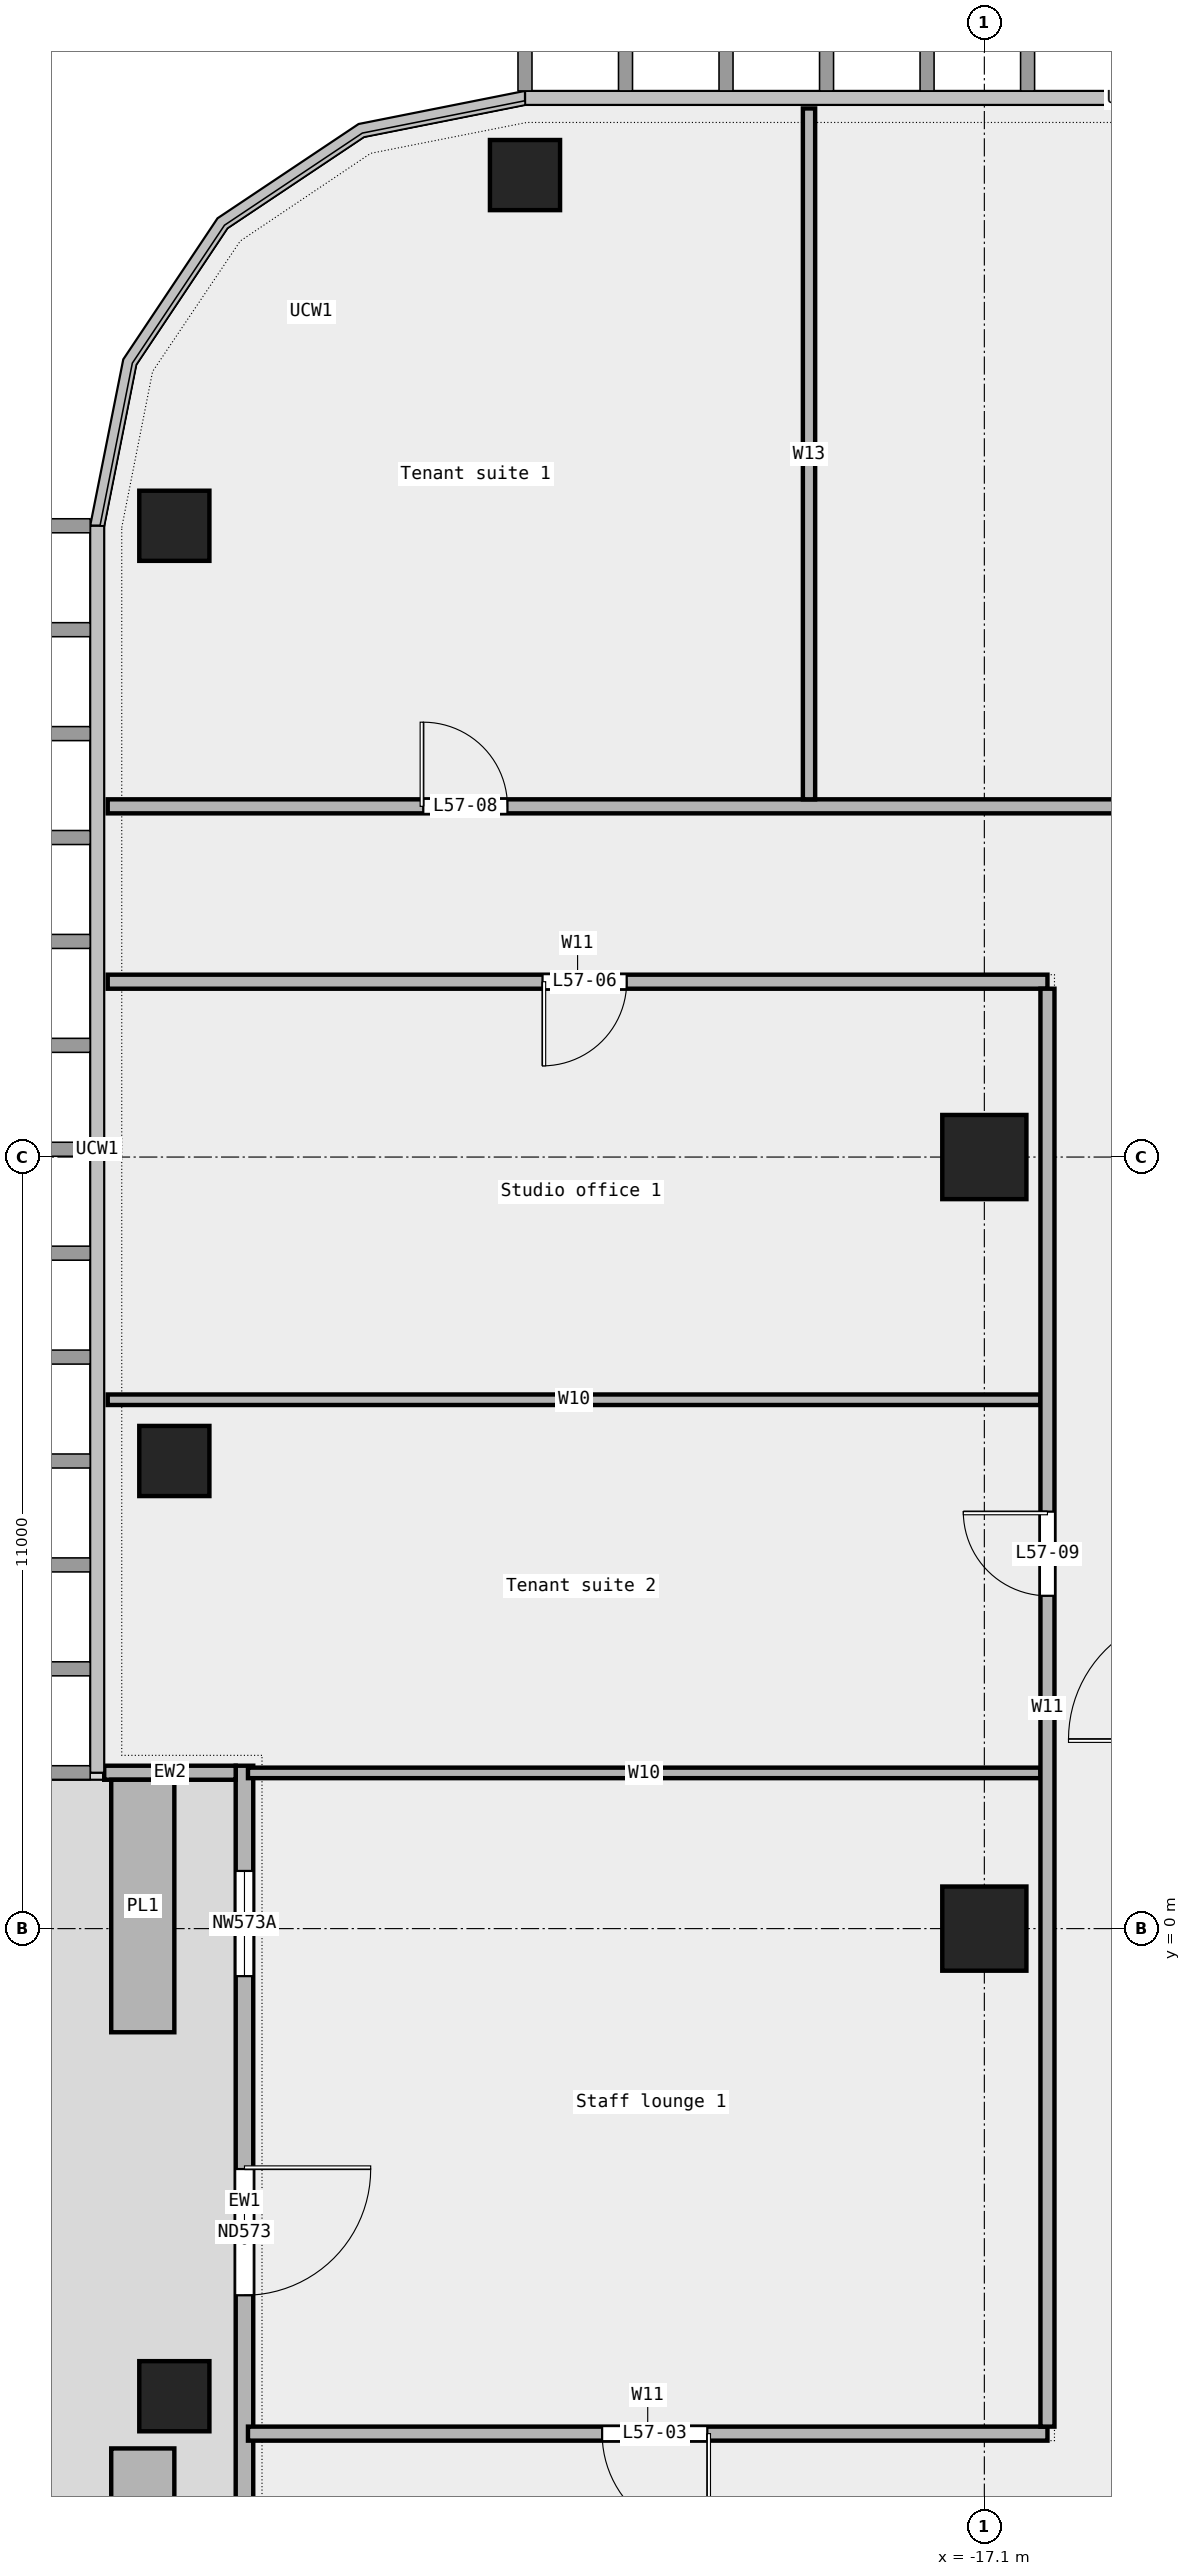
"""IFC4 building model, lengths in metres.
Left out: names, types, materials, properties, quantities, classifications, styles, units other than length and angle.
Written with IfcOpenShell. Run it as: python <this file> out.ifc"""

import sys

from ifc_helpers import new_model, si_unit, direction, frame, frame_2d, origin, origin_2d, place, context, subcontext, project, spatial, rectangle, extrude, element, fill, save


model = new_model("IFC4")
c1 = context("Model", 3, precision=1e-05, world=origin(), true_north=direction((0.0, 1.0)))
c2 = subcontext(c1, "Body", "Model", "MODEL_VIEW")
j1 = project(units=[si_unit("LENGTHUNIT", "METRE"), si_unit("PLANEANGLEUNIT", "RADIAN")], contexts=[c1])
p1 = place(None, origin())
s1 = spatial("IfcSite", under=j1, at=p1, CompositionType="ELEMENT")
p2 = place(p1, origin())
s2 = spatial("IfcBuilding", under=s1, at=p2, CompositionType="ELEMENT")
p3 = place(p2, frame((0.0, 0.0, 267.4)))
s3 = spatial("IfcBuildingStorey", under=s2, at=p3, CompositionType="ELEMENT", Elevation=267.4)
for number, where, z_axis, x_axis in (
    (1, (-23.65, 25.0, 0.0), (0.0, 0.0, 1.0), (1.0, 0.0, 0.0)),
    (2, (-28.65, 20.0, 0.0), (0.0, 0.0, 1.0), (1.0, 0.0, 0.0)),
    (3, (-28.65, 6.667, 0.0), (0.0, 0.0, 1.0), (1.0, 0.0, 0.0)),
    (4, (-28.65, -6.667, 0.0), (0.0, 0.0, 1.0), (1.0, 0.0, 0.0)),
):
    element("IfcColumn", number, at=place(p3, frame(where, z_axis=z_axis, x_axis=x_axis)), inside=s3, PredefinedType="COLUMN", context=c2, shape_type="SweptSolid", body=[
        extrude(rectangle(XDim=1.0, YDim=1.0, at=origin_2d()), origin(), (0.0, 0.0, 1.0), 3.6),
    ])
for number, where, z_axis, x_axis in (
    (5, (-17.1, 0.0, 0.0), (0.0, 0.0, 1.0), (1.0, 0.0, 0.0)),
    (6, (-17.1, 11.0, 0.0), (0.0, 0.0, 1.0), (1.0, 0.0, 0.0)),
):
    element("IfcColumn", number, at=place(p3, frame(where, z_axis=z_axis, x_axis=x_axis)), inside=s3, PredefinedType="COLUMN", context=c2, shape_type="SweptSolid", body=[
        extrude(rectangle(XDim=1.2, YDim=1.2, at=origin_2d()), origin(), (0.0, 0.0, 1.0), 3.6),
    ])
p4 = place(p3, frame((-27.65, 2.322, 0.0), z_axis=(0.0, 0.0, 1.0), x_axis=(0.0, -1.0, 0.0)))
e7 = element("IfcWall", 7, at=p4, inside=s3, PredefinedType="STANDARD", context=c2, shape_type="SweptSolid", body=[
    extrude(rectangle(XDim=13.533, YDim=0.25, at=frame_2d((6.767, 0.0))), origin(), (0.0, 0.0, 1.0), 3.6),
])
p5 = place(p4, frame((1.5, 0.0, 0.45)))
e8 = element("IfcOpeningElement", 8, at=p5, cuts=e7, PredefinedType="OPENING", context=c2, shape_type="SweptSolid", body=[
    extrude(rectangle(XDim=1.5, YDim=2.4, at=frame_2d((0.75, 1.2))), frame((0.0, 0.137, 0.0), z_axis=(0.0, -1.0, 0.0), x_axis=(1.0, 0.0, 0.0)), (0.0, 0.0, 1.0), 0.274),
])
p6 = place(p4, frame((5.75, 0.0, 0.0)))
e9 = element("IfcOpeningElement", 9, at=p6, cuts=e7, PredefinedType="OPENING", context=c2, shape_type="SweptSolid", body=[
    extrude(rectangle(XDim=1.8, YDim=2.4, at=frame_2d((0.9, 1.2))), frame((0.0, 0.137, 0.0), z_axis=(0.0, -1.0, 0.0), x_axis=(1.0, 0.0, 0.0)), (0.0, 0.0, 1.0), 0.274),
])
p7 = place(p4, frame((10.5, 0.0, 0.45)))
e10 = element("IfcOpeningElement", 10, at=p7, cuts=e7, PredefinedType="OPENING", context=c2, shape_type="SweptSolid", body=[
    extrude(rectangle(XDim=1.5, YDim=2.4, at=frame_2d((0.75, 1.2))), frame((0.0, 0.137, 0.0), z_axis=(0.0, -1.0, 0.0), x_axis=(1.0, 0.0, 0.0)), (0.0, 0.0, 1.0), 0.274),
])
p8 = place(p3, frame((-29.65, 2.222, 0.0), z_axis=(0.0, 0.0, 1.0), x_axis=(1.0, 0.0, 0.0)))
e11 = element("IfcWall", 11, at=p8, inside=s3, PredefinedType="STANDARD", context=c2, shape_type="SweptSolid", body=[
    extrude(rectangle(XDim=1.875, YDim=0.2, at=frame_2d((0.938, 0.0))), origin(), (0.0, 0.0, 1.0), 3.6),
])
for number, where, z_axis, x_axis in (
    (12, (-29.1, 2.122, 0.0), (0.0, 0.0, 1.0), (0.0, -1.0, 0.0)),
    (13, (-29.1, -7.411, 0.0), (0.0, 0.0, 1.0), (0.0, -1.0, 0.0)),
):
    element("IfcWall", number, at=place(p3, frame(where, z_axis=z_axis, x_axis=x_axis)), inside=s3, PredefinedType="STANDARD", context=c2, shape_type="SweptSolid", body=[
        extrude(rectangle(XDim=3.6, YDim=0.9, at=frame_2d((1.8, 0.0))), origin(), (0.0, 0.0, 1.0), 0.7),
    ])
p9 = place(p3, frame((-27.6, -7.2, 0.0), z_axis=(0.0, 0.0, 1.0), x_axis=(1.0, 0.0, 0.0)))
e14 = element("IfcWall", 14, at=p9, inside=s3, PredefinedType="PARTITIONING", context=c2, shape_type="SweptSolid", body=[
    extrude(rectangle(XDim=11.4, YDim=0.2, at=frame_2d((5.7, 0.0))), origin(), (0.0, 0.0, 1.0), 3.6),
])
p10 = place(p9, frame((5.05, 0.0, 0.0)))
e15 = element("IfcOpeningElement", 15, at=p10, cuts=e14, PredefinedType="OPENING", context=c2, shape_type="SweptSolid", body=[
    extrude(rectangle(XDim=1.5, YDim=2.1, at=frame_2d((0.75, 1.05))), frame((0.0, 0.112, 0.0), z_axis=(0.0, -1.0, 0.0), x_axis=(1.0, 0.0, 0.0)), (0.0, 0.0, 1.0), 0.224),
])
p11 = place(p3, frame((-27.6, 2.22, 0.0), z_axis=(0.0, 0.0, 1.0), x_axis=(1.0, 0.0, 0.0)))
e16 = element("IfcWall", 16, at=p11, inside=s3, PredefinedType="PARTITIONING", context=c2, shape_type="SweptSolid", body=[
    extrude(rectangle(XDim=11.3, YDim=0.15, at=frame_2d((5.65, 0.0))), origin(), (0.0, 0.0, 1.0), 3.6),
])
p12 = place(p3, frame((-29.6, 7.54, 0.0), z_axis=(0.0, 0.0, 1.0), x_axis=(1.0, 0.0, 0.0)))
e17 = element("IfcWall", 17, at=p12, inside=s3, PredefinedType="PARTITIONING", context=c2, shape_type="SweptSolid", body=[
    extrude(rectangle(XDim=13.3, YDim=0.15, at=frame_2d((6.65, 0.0))), origin(), (0.0, 0.0, 1.0), 3.6),
])
p13 = place(p3, frame((-29.6, 13.5, 0.0), z_axis=(0.0, 0.0, 1.0), x_axis=(1.0, 0.0, 0.0)))
e18 = element("IfcWall", 18, at=p13, inside=s3, PredefinedType="PARTITIONING", context=c2, shape_type="SweptSolid", body=[
    extrude(rectangle(XDim=13.4, YDim=0.2, at=frame_2d((6.7, 0.0))), origin(), (0.0, 0.0, 1.0), 3.6),
])
p14 = place(p13, frame((6.2, 0.0, 0.0)))
e19 = element("IfcOpeningElement", 19, at=p14, cuts=e18, PredefinedType="OPENING", context=c2, shape_type="SweptSolid", body=[
    extrude(rectangle(XDim=1.2, YDim=2.1, at=frame_2d((0.6, 1.05))), frame((0.0, 0.112, 0.0), z_axis=(0.0, -1.0, 0.0), x_axis=(1.0, 0.0, 0.0)), (0.0, 0.0, 1.0), 0.224),
])
p15 = place(p3, frame((-29.6, 16.0, 0.0), z_axis=(0.0, 0.0, 1.0), x_axis=(1.0, 0.0, 0.0)))
e20 = element("IfcWall", 20, at=p15, inside=s3, PredefinedType="PARTITIONING", context=c2, shape_type="SweptSolid", body=[
    extrude(rectangle(XDim=59.2, YDim=0.2, at=frame_2d((29.6, 0.0))), origin(), (0.0, 0.0, 1.0), 3.6),
])
p16 = place(p15, frame((46.625, 0.0, 0.0)))
e21 = element("IfcOpeningElement", 21, at=p16, cuts=e20, PredefinedType="OPENING", context=c2, shape_type="SweptSolid", body=[
    extrude(rectangle(XDim=1.8, YDim=2.1, at=frame_2d((0.9, 1.05))), frame((0.0, 0.112, 0.0), z_axis=(0.0, -1.0, 0.0), x_axis=(1.0, 0.0, 0.0)), (0.0, 0.0, 1.0), 0.224),
])
p17 = place(p15, frame((28.85, 0.0, 0.0)))
e22 = element("IfcOpeningElement", 22, at=p17, cuts=e20, PredefinedType="OPENING", context=c2, shape_type="SweptSolid", body=[
    extrude(rectangle(XDim=1.5, YDim=2.1, at=frame_2d((0.75, 1.05))), frame((0.0, 0.112, 0.0), z_axis=(0.0, -1.0, 0.0), x_axis=(1.0, 0.0, 0.0)), (0.0, 0.0, 1.0), 0.224),
])
p18 = place(p15, frame((4.5, 0.0, 0.0)))
e23 = element("IfcOpeningElement", 23, at=p18, cuts=e20, PredefinedType="OPENING", context=c2, shape_type="SweptSolid", body=[
    extrude(rectangle(XDim=1.2, YDim=2.1, at=frame_2d((0.6, 1.05))), frame((0.0, 0.112, 0.0), z_axis=(0.0, -1.0, 0.0), x_axis=(1.0, 0.0, 0.0)), (0.0, 0.0, 1.0), 0.224),
])
p19 = place(p15, frame((15.825, 0.0, 0.0)))
e24 = element("IfcOpeningElement", 24, at=p19, cuts=e20, PredefinedType="OPENING", context=c2, shape_type="SweptSolid", body=[
    extrude(rectangle(XDim=1.5, YDim=2.1, at=frame_2d((0.75, 1.05))), frame((0.0, 0.112, 0.0), z_axis=(0.0, -1.0, 0.0), x_axis=(1.0, 0.0, 0.0)), (0.0, 0.0, 1.0), 0.224),
])
p20 = place(p3, frame((-19.6, 16.1, 0.0), z_axis=(0.0, 0.0, 1.0), x_axis=(0.0, 1.0, 0.0)))
e25 = element("IfcWall", 25, at=p20, inside=s3, PredefinedType="PARTITIONING", context=c2, shape_type="SweptSolid", body=[
    extrude(rectangle(XDim=9.85, YDim=0.175, at=frame_2d((4.925, 0.0))), origin(), (0.0, 0.0, 1.0), 3.6),
])
p21 = place(p3, frame((-16.2, -7.1, 0.0), z_axis=(0.0, 0.0, 1.0), x_axis=(0.0, 1.0, 0.0)))
e26 = element("IfcWall", 26, at=p21, inside=s3, PredefinedType="PARTITIONING", context=c2, shape_type="SweptSolid", body=[
    extrude(rectangle(XDim=20.5, YDim=0.2, at=frame_2d((10.25, 0.0))), origin(), (0.0, 0.0, 1.0), 3.6),
])
p22 = place(p21, frame((11.845, 0.0, 0.0)))
e27 = element("IfcOpeningElement", 27, at=p22, cuts=e26, PredefinedType="OPENING", context=c2, shape_type="SweptSolid", body=[
    extrude(rectangle(XDim=1.2, YDim=2.1, at=frame_2d((0.6, 1.05))), frame((0.0, 0.112, 0.0), z_axis=(0.0, -1.0, 0.0), x_axis=(1.0, 0.0, 0.0)), (0.0, 0.0, 1.0), 0.224),
])
p23 = place(p5, origin())
e28 = element("IfcWindow", 28, at=p23, inside=s3, PartitioningType="SINGLE_PANEL", PredefinedType="WINDOW", context=c2, shape_type="SweptSolid", body=[
    extrude(rectangle(XDim=1.5, YDim=2.4, at=frame_2d((0.75, 1.2))), frame((0.0, 0.03, 0.0), z_axis=(0.0, -1.0, 0.0), x_axis=(1.0, 0.0, 0.0)), (0.0, 0.0, 1.0), 0.06),
])
fill(e8, e28)
p24 = place(p6, origin())
e29 = element("IfcDoor", 29, at=p24, inside=s3, OperationType="DOUBLE_DOOR_SINGLE_SWING", PredefinedType="DOOR", context=c2, shape_type="SweptSolid", body=[
    extrude(rectangle(XDim=1.8, YDim=2.4, at=frame_2d((0.9, 1.2))), frame((0.0, 0.025, 0.0), z_axis=(0.0, -1.0, 0.0), x_axis=(1.0, 0.0, 0.0)), (0.0, 0.0, 1.0), 0.05),
])
fill(e9, e29)
p25 = place(p10, origin())
e30 = element("IfcDoor", 30, at=p25, inside=s3, OperationType="DOUBLE_DOOR_SINGLE_SWING", PredefinedType="DOOR", context=c2, shape_type="SweptSolid", body=[
    extrude(rectangle(XDim=1.5, YDim=2.1, at=frame_2d((0.75, 1.05))), frame((0.0, 0.025, 0.0), z_axis=(0.0, -1.0, 0.0), x_axis=(1.0, 0.0, 0.0)), (0.0, 0.0, 1.0), 0.05),
])
fill(e15, e30)
p26 = place(p14, origin())
e31 = element("IfcDoor", 31, at=p26, inside=s3, OperationType="SINGLE_SWING_RIGHT", PredefinedType="DOOR", context=c2, shape_type="SweptSolid", body=[
    extrude(rectangle(XDim=1.2, YDim=2.1, at=frame_2d((0.6, 1.05))), frame((0.0, 0.025, 0.0), z_axis=(0.0, -1.0, 0.0), x_axis=(1.0, 0.0, 0.0)), (0.0, 0.0, 1.0), 0.05),
])
fill(e19, e31)
p27 = place(p18, origin())
e32 = element("IfcDoor", 32, at=p27, inside=s3, OperationType="SINGLE_SWING_LEFT", PredefinedType="DOOR", context=c2, shape_type="SweptSolid", body=[
    extrude(rectangle(XDim=1.2, YDim=2.1, at=frame_2d((0.6, 1.05))), frame((0.0, 0.025, 0.0), z_axis=(0.0, -1.0, 0.0), x_axis=(1.0, 0.0, 0.0)), (0.0, 0.0, 1.0), 0.05),
])
fill(e23, e32)
p28 = place(p22, origin())
e33 = element("IfcDoor", 33, at=p28, inside=s3, OperationType="SINGLE_SWING_RIGHT", PredefinedType="DOOR", context=c2, shape_type="SweptSolid", body=[
    extrude(rectangle(XDim=1.2, YDim=2.1, at=frame_2d((0.6, 1.05))), frame((0.0, 0.025, 0.0), z_axis=(0.0, -1.0, 0.0), x_axis=(1.0, 0.0, 0.0)), (0.0, 0.0, 1.0), 0.05),
])
fill(e27, e33)
save(model, sys.argv[1])
